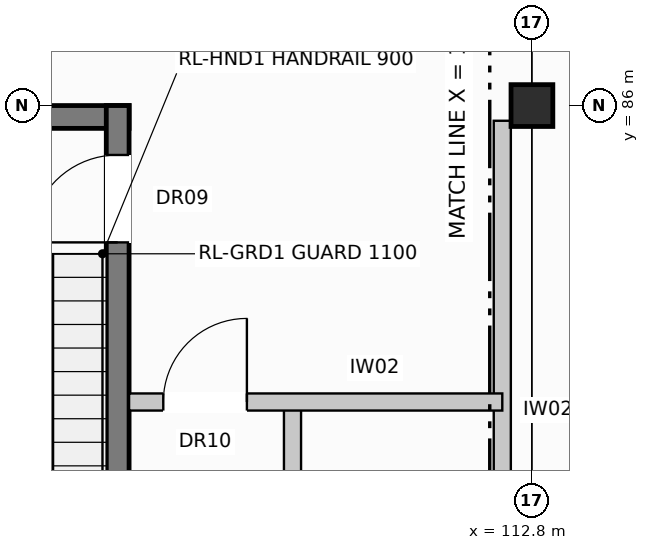
"""IFC4 building model, lengths in metres.
Left out: names, types, materials, properties, quantities, classifications, styles, units other than length and angle.
Written with IfcOpenShell. Run it as: python <this file> out.ifc"""

import sys

from ifc_helpers import new_model, si_unit, direction, frame, frame_2d, origin, origin_with_axes, origin_2d, place, context, subcontext, project, spatial, rectangle, extrude, element, fill, save


model = new_model("IFC4")
c1 = context("Model", 3, precision=1e-05, world=origin(), true_north=direction((0.0, 1.0)))
c2 = subcontext(c1, "Body", "Model", "MODEL_VIEW")
j1 = project(units=[si_unit("LENGTHUNIT", "METRE"), si_unit("PLANEANGLEUNIT", "RADIAN")], contexts=[c1])
p1 = place(None, origin())
s1 = spatial("IfcSite", under=j1, at=p1, CompositionType="ELEMENT")
p2 = place(p1, origin())
s2 = spatial("IfcBuilding", under=s1, at=p2, CompositionType="ELEMENT")
p3 = place(p2, frame((0.0, 0.0, -3.8)))
s3 = spatial("IfcBuildingStorey", under=s2, at=p3, CompositionType="ELEMENT", Elevation=-3.8)
p4 = place(p3, frame((112.8, 86.0, 0.0), z_axis=(0.0, 0.0, 1.0), x_axis=(1.0, 0.0, 0.0)))
e1 = element("IfcColumn", 1, at=p4, inside=s3, PredefinedType="COLUMN", context=c2, shape_type="SweptSolid", body=[
    extrude(rectangle(XDim=0.55, YDim=0.55, at=origin_2d()), origin(), (0.0, 0.0, 1.0), 3.8),
])
p5 = place(p3, frame((103.9, 85.85, 0.0), z_axis=(0.0, 0.0, 1.0), x_axis=(1.0, 0.0, 0.0)))
e2 = element("IfcWall", 2, at=p5, inside=s3, PredefinedType="SHEAR", context=c2, shape_type="SweptSolid", body=[
    extrude(rectangle(XDim=3.6, YDim=0.3, at=frame_2d((1.8, 0.0))), origin(), (0.0, 0.0, 1.0), 3.48),
])
p6 = place(p3, frame((107.35, 78.5, 0.0), z_axis=(0.0, 0.0, 1.0), x_axis=(0.0, 1.0, 0.0)))
e3 = element("IfcWall", 3, at=p6, inside=s3, PredefinedType="SHEAR", context=c2, shape_type="SweptSolid", body=[
    extrude(rectangle(XDim=7.5, YDim=0.3, at=frame_2d((3.75, 0.0))), origin(), (0.0, 0.0, 1.0), 3.48),
])
p7 = place(p6, frame((5.7, 0.0, 0.0)))
e4 = element("IfcOpeningElement", 4, at=p7, cuts=e3, PredefinedType="OPENING", context=c2, shape_type="SweptSolid", body=[
    extrude(rectangle(XDim=1.15, YDim=2.15, at=frame_2d((0.575, 1.075))), frame((0.0, 0.162, 0.0), z_axis=(0.0, -1.0, 0.0), x_axis=(1.0, 0.0, 0.0)), (0.0, 0.0, 1.0), 0.324),
])
p8 = place(p3, frame((112.41, 78.2, 0.0), z_axis=(0.0, 0.0, 1.0), x_axis=(0.0, 1.0, 0.0)))
e5 = element("IfcWall", 5, at=p8, inside=s3, PredefinedType="PARTITIONING", context=c2, shape_type="SweptSolid", body=[
    extrude(rectangle(XDim=7.6, YDim=0.225, at=frame_2d((3.8, 0.0))), origin(), (0.0, 0.0, 1.0), 2.72),
])
p9 = place(p3, frame((109.65, 78.2, 0.0), z_axis=(0.0, 0.0, 1.0), x_axis=(0.0, 1.0, 0.0)))
e6 = element("IfcWall", 6, at=p9, inside=s3, PredefinedType="PARTITIONING", context=c2, shape_type="SweptSolid", body=[
    extrude(rectangle(XDim=3.8, YDim=0.225, at=frame_2d((1.9, 0.0))), origin(), (0.0, 0.0, 1.0), 3.48),
])
p10 = place(p3, frame((107.5, 82.1, 0.0), z_axis=(0.0, 0.0, 1.0), x_axis=(1.0, 0.0, 0.0)))
e7 = element("IfcWall", 7, at=p10, inside=s3, PredefinedType="PARTITIONING", context=c2, shape_type="SweptSolid", body=[
    extrude(rectangle(XDim=4.91, YDim=0.225, at=frame_2d((2.455, 0.0))), origin(), (0.0, 0.0, 1.0), 3.48),
])
p11 = place(p10, frame((0.45, 0.0, 0.0)))
e8 = element("IfcOpeningElement", 8, at=p11, cuts=e7, PredefinedType="OPENING", context=c2, shape_type="SweptSolid", body=[
    extrude(rectangle(XDim=1.1, YDim=2.15, at=frame_2d((0.55, 1.075))), frame((0.0, 0.125, 0.0), z_axis=(0.0, -1.0, 0.0), x_axis=(1.0, 0.0, 0.0)), (0.0, 0.0, 1.0), 0.249),
])
p12 = place(p7, origin_with_axes())
e9 = element("IfcDoor", 9, at=p12, inside=s3, OperationType="SINGLE_SWING_LEFT", PredefinedType="DOOR", context=c2, shape_type="SweptSolid", body=[
    extrude(rectangle(XDim=1.15, YDim=2.15, at=frame_2d((0.575, 1.075))), frame((0.0, 0.025, 0.0), z_axis=(0.0, -1.0, 0.0), x_axis=(1.0, 0.0, 0.0)), (0.0, 0.0, 1.0), 0.05),
])
fill(e4, e9)
p13 = place(p11, origin_with_axes())
e10 = element("IfcDoor", 10, at=p13, inside=s3, OperationType="SINGLE_SWING_RIGHT", PredefinedType="DOOR", context=c2, shape_type="SweptSolid", body=[
    extrude(rectangle(XDim=1.1, YDim=2.15, at=frame_2d((0.55, 1.075))), frame((0.0, 0.025, 0.0), z_axis=(0.0, -1.0, 0.0), x_axis=(1.0, 0.0, 0.0)), (0.0, 0.0, 1.0), 0.05),
])
fill(e8, e10)
save(model, sys.argv[1])
